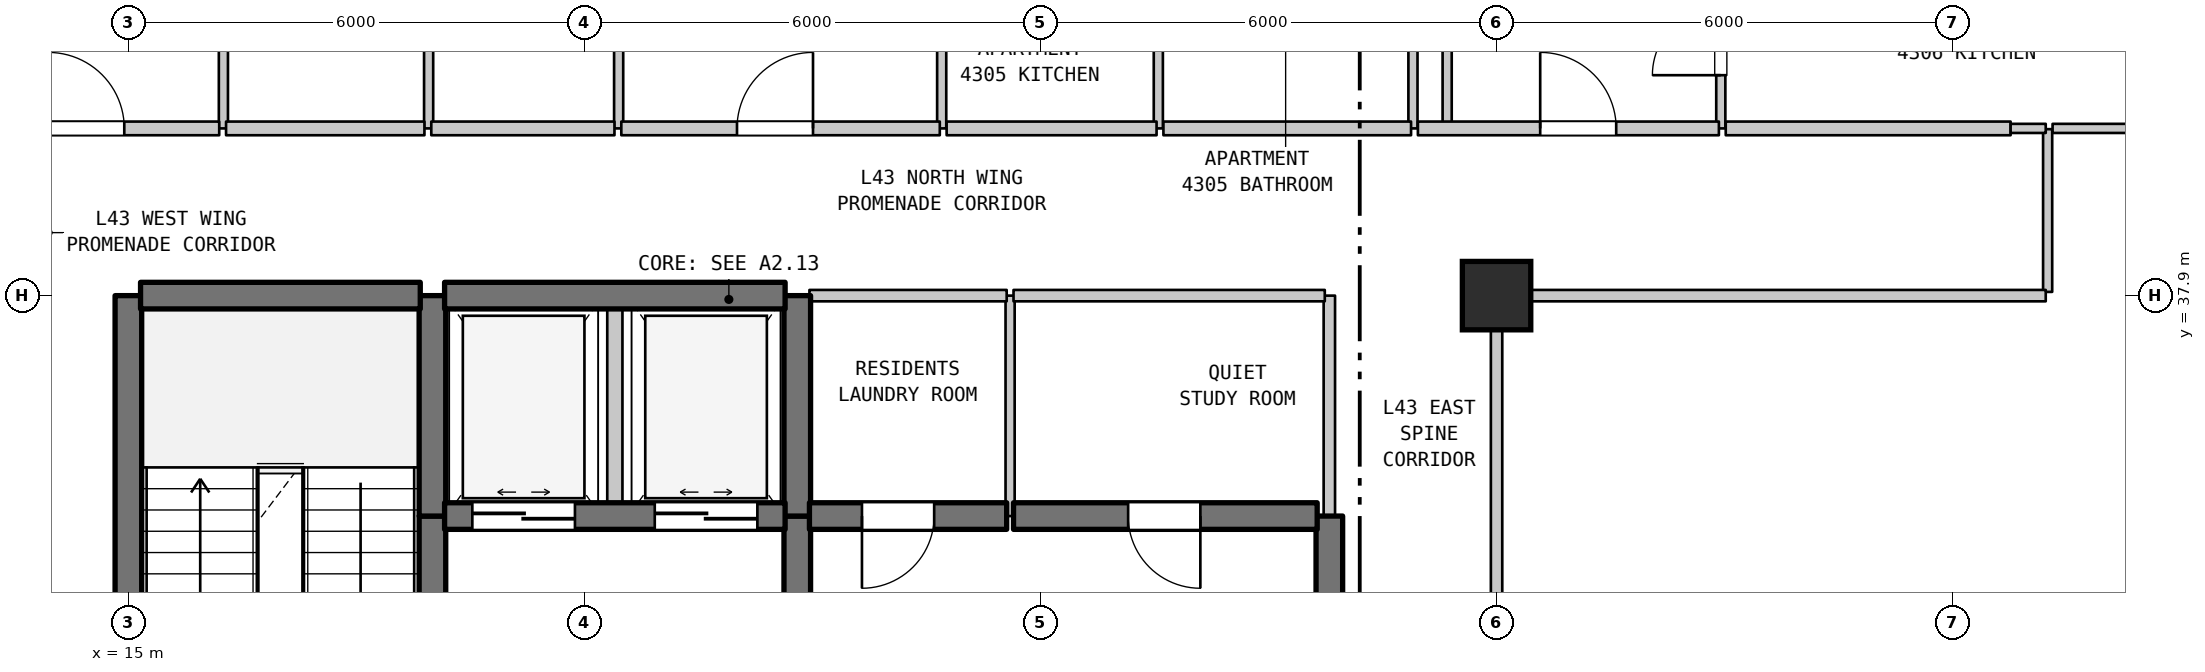
"""IFC4 building model, lengths in metres.
Left out: names, types, materials, properties, quantities, classifications, styles, units other than length and angle.
Written with IfcOpenShell. Run it as: python <this file> out.ifc"""

import sys

from ifc_helpers import new_model, si_unit, direction, frame, frame_2d, origin, origin_2d, place, context, subcontext, project, spatial, rectangle, extrude, element, fill, save


model = new_model("IFC4")
c1 = context("Model", 3, precision=1e-05, world=origin(), true_north=direction((0.0, 1.0)))
c2 = subcontext(c1, "Body", "Model", "MODEL_VIEW")
j1 = project(units=[si_unit("LENGTHUNIT", "METRE"), si_unit("PLANEANGLEUNIT", "RADIAN")], contexts=[c1])
p1 = place(None, origin())
s1 = spatial("IfcSite", under=j1, at=p1, CompositionType="ELEMENT")
p2 = place(p1, origin())
s2 = spatial("IfcBuilding", under=s1, at=p2, CompositionType="ELEMENT")
p3 = place(p2, frame((0.0, 0.0, 176.5)))
s3 = spatial("IfcBuildingStorey", under=s2, at=p3, CompositionType="ELEMENT", Elevation=176.5)
p4 = place(p3, frame((33.0, 37.9, 0.0), z_axis=(0.0, 0.0, 1.0), x_axis=(1.0, 0.0, 0.0)))
e1 = element("IfcColumn", 1, at=p4, inside=s3, PredefinedType="COLUMN", context=c2, shape_type="SweptSolid", body=[
    extrude(rectangle(XDim=0.9, YDim=0.9, at=origin_2d()), origin(), (0.0, 0.0, 1.0), 3.7),
])
p5 = place(p3, frame((15.0, 31.1, 0.0), z_axis=(0.0, 0.0, 1.0), x_axis=(0.0, 1.0, 0.0)))
e2 = element("IfcWall", 2, at=p5, inside=s3, PredefinedType="SHEAR", context=c2, shape_type="SweptSolid", body=[
    extrude(rectangle(XDim=6.8, YDim=0.35, at=frame_2d((3.4, 0.0))), origin(), (0.0, 0.0, 1.0), 3.39),
])
p6 = place(p3, frame((16.25, 40.1, 0.0), z_axis=(0.0, 0.0, 1.0), x_axis=(0.0, 1.0, 0.0)))
e3 = element("IfcWall", 3, at=p6, inside=s3, PredefinedType="PARTITIONING", context=c2, shape_type="SweptSolid", body=[
    extrude(rectangle(XDim=3.2, YDim=0.12, at=frame_2d((1.6, 0.0))), origin(), (0.0, 0.0, 1.0), 3.39),
])
p7 = place(p3, frame((18.95, 40.1, 0.0), z_axis=(0.0, 0.0, 1.0), x_axis=(0.0, 1.0, 0.0)))
e4 = element("IfcWall", 4, at=p7, inside=s3, PredefinedType="PARTITIONING", context=c2, shape_type="SweptSolid", body=[
    extrude(rectangle(XDim=3.2, YDim=0.12, at=frame_2d((1.6, 0.0))), origin(), (0.0, 0.0, 1.0), 3.39),
])
p8 = place(p7, frame((1.15, 0.0, 0.0)))
e5 = element("IfcOpeningElement", 5, at=p8, cuts=e4, PredefinedType="OPENING", context=c2, shape_type="SweptSolid", body=[
    extrude(rectangle(XDim=0.9, YDim=2.15, at=frame_2d((0.45, 1.075))), frame((0.0, 0.07, 0.0), z_axis=(0.0, -1.0, 0.0), x_axis=(1.0, 0.0, 0.0)), (0.0, 0.0, 1.0), 0.14),
])
p9 = place(p3, frame((19.0, 29.5, 0.0), z_axis=(0.0, 0.0, 1.0), x_axis=(0.0, 1.0, 0.0)))
e6 = element("IfcWall", 6, at=p9, inside=s3, PredefinedType="SHEAR", context=c2, shape_type="SweptSolid", body=[
    extrude(rectangle(XDim=5.5, YDim=0.35, at=frame_2d((2.75, 0.0))), origin(), (0.0, 0.0, 1.0), 3.39),
])
p10 = place(p9, frame((2.025, 0.0, 0.0)))
e7 = element("IfcOpeningElement", 7, at=p10, cuts=e6, PredefinedType="OPENING", context=c2, shape_type="SweptSolid", body=[
    extrude(rectangle(XDim=1.1, YDim=2.15, at=frame_2d((0.55, 1.075))), frame((0.0, 0.185, 0.0), z_axis=(0.0, -1.0, 0.0), x_axis=(1.0, 0.0, 0.0)), (0.0, 0.0, 1.0), 0.37),
])
p11 = place(p3, frame((19.0, 35.0, 0.0), z_axis=(0.0, 0.0, 1.0), x_axis=(0.0, 1.0, 0.0)))
e8 = element("IfcWall", 8, at=p11, inside=s3, PredefinedType="SHEAR", context=c2, shape_type="SweptSolid", body=[
    extrude(rectangle(XDim=2.9, YDim=0.35, at=frame_2d((1.45, 0.0))), origin(), (0.0, 0.0, 1.0), 3.39),
])
p12 = place(p3, frame((21.4, 35.0, 0.0), z_axis=(0.0, 0.0, 1.0), x_axis=(0.0, 1.0, 0.0)))
e9 = element("IfcWall", 9, at=p12, inside=s3, PredefinedType="STANDARD", context=c2, shape_type="SweptSolid", body=[
    extrude(rectangle(XDim=2.9, YDim=0.2, at=frame_2d((1.45, 0.0))), origin(), (0.0, 0.0, 1.0), 3.39),
])
p13 = place(p3, frame((21.45, 40.1, 0.0), z_axis=(0.0, 0.0, 1.0), x_axis=(0.0, 1.0, 0.0)))
e10 = element("IfcWall", 10, at=p13, inside=s3, PredefinedType="PARTITIONING", context=c2, shape_type="SweptSolid", body=[
    extrude(rectangle(XDim=13.79, YDim=0.12, at=frame_2d((6.895, 0.0))), origin(), (0.0, 0.0, 1.0), 3.39),
])
p14 = place(p3, frame((23.8, 31.5, 0.0), z_axis=(0.0, 0.0, 1.0), x_axis=(0.0, 1.0, 0.0)))
e11 = element("IfcWall", 11, at=p14, inside=s3, PredefinedType="SHEAR", context=c2, shape_type="SweptSolid", body=[
    extrude(rectangle(XDim=3.5, YDim=0.35, at=frame_2d((1.75, 0.0))), origin(), (0.0, 0.0, 1.0), 3.39),
])
p15 = place(p14, frame((1.127, 0.0, 0.0)))
e12 = element("IfcOpeningElement", 12, at=p15, cuts=e11, PredefinedType="OPENING", context=c2, shape_type="SweptSolid", body=[
    extrude(rectangle(XDim=1.1, YDim=2.15, at=frame_2d((0.55, 1.075))), frame((0.0, 0.185, 0.0), z_axis=(0.0, -1.0, 0.0), x_axis=(1.0, 0.0, 0.0)), (0.0, 0.0, 1.0), 0.37),
])
p16 = place(p3, frame((23.8, 35.0, 0.0), z_axis=(0.0, 0.0, 1.0), x_axis=(0.0, 1.0, 0.0)))
e13 = element("IfcWall", 13, at=p16, inside=s3, PredefinedType="SHEAR", context=c2, shape_type="SweptSolid", body=[
    extrude(rectangle(XDim=2.9, YDim=0.35, at=frame_2d((1.45, 0.0))), origin(), (0.0, 0.0, 1.0), 3.39),
])
p17 = place(p3, frame((25.7, 40.1, 0.0), z_axis=(0.0, 0.0, 1.0), x_axis=(0.0, 1.0, 0.0)))
e14 = element("IfcWall", 14, at=p17, inside=s3, PredefinedType="PARTITIONING", context=c2, shape_type="SweptSolid", body=[
    extrude(rectangle(XDim=2.3, YDim=0.12, at=frame_2d((1.15, 0.0))), origin(), (0.0, 0.0, 1.0), 3.39),
])
p18 = place(p3, frame((26.6, 35.0, 0.0), z_axis=(0.0, 0.0, 1.0), x_axis=(0.0, 1.0, 0.0)))
e15 = element("IfcWall", 15, at=p18, inside=s3, PredefinedType="PARTITIONING", context=c2, shape_type="SweptSolid", body=[
    extrude(rectangle(XDim=2.9, YDim=0.12, at=frame_2d((1.45, 0.0))), origin(), (0.0, 0.0, 1.0), 3.39),
])
p19 = place(p3, frame((28.55, 40.1, 0.0), z_axis=(0.0, 0.0, 1.0), x_axis=(0.0, 1.0, 0.0)))
e16 = element("IfcWall", 16, at=p19, inside=s3, PredefinedType="PARTITIONING", context=c2, shape_type="SweptSolid", body=[
    extrude(rectangle(XDim=2.3, YDim=0.12, at=frame_2d((1.15, 0.0))), origin(), (0.0, 0.0, 1.0), 3.39),
])
p20 = place(p3, frame((30.8, 31.5, 0.0), z_axis=(0.0, 0.0, 1.0), x_axis=(0.0, 1.0, 0.0)))
e17 = element("IfcWall", 17, at=p20, inside=s3, PredefinedType="SHEAR", context=c2, shape_type="SweptSolid", body=[
    extrude(rectangle(XDim=3.5, YDim=0.35, at=frame_2d((1.75, 0.0))), origin(), (0.0, 0.0, 1.0), 3.39),
])
p21 = place(p20, frame((1.15, 0.0, 0.0)))
e18 = element("IfcOpeningElement", 18, at=p21, cuts=e17, PredefinedType="OPENING", context=c2, shape_type="SweptSolid", body=[
    extrude(rectangle(XDim=1.2, YDim=2.2, at=frame_2d((0.6, 1.1))), frame((0.0, 0.185, 0.0), z_axis=(0.0, -1.0, 0.0), x_axis=(1.0, 0.0, 0.0)), (0.0, 0.0, 1.0), 0.37),
])
p22 = place(p3, frame((30.8, 35.0, 0.0), z_axis=(0.0, 0.0, 1.0), x_axis=(0.0, 1.0, 0.0)))
e19 = element("IfcWall", 19, at=p22, inside=s3, PredefinedType="STANDARD", context=c2, shape_type="SweptSolid", body=[
    extrude(rectangle(XDim=2.9, YDim=0.15, at=frame_2d((1.45, 0.0))), origin(), (0.0, 0.0, 1.0), 3.39),
])
p23 = place(p3, frame((31.9, 40.1, 0.0), z_axis=(0.0, 0.0, 1.0), x_axis=(0.0, 1.0, 0.0)))
e20 = element("IfcWall", 20, at=p23, inside=s3, PredefinedType="PARTITIONING", context=c2, shape_type="SweptSolid", body=[
    extrude(rectangle(XDim=2.3, YDim=0.12, at=frame_2d((1.15, 0.0))), origin(), (0.0, 0.0, 1.0), 3.39),
])
p24 = place(p3, frame((32.35, 40.1, 0.0), z_axis=(0.0, 0.0, 1.0), x_axis=(0.0, 1.0, 0.0)))
e21 = element("IfcWall", 21, at=p24, inside=s3, PredefinedType="PARTITIONING", context=c2, shape_type="SweptSolid", body=[
    extrude(rectangle(XDim=13.79, YDim=0.12, at=frame_2d((6.895, 0.0))), origin(), (0.0, 0.0, 1.0), 3.39),
])
p25 = place(p3, frame((35.95, 40.1, 0.0), z_axis=(0.0, 0.0, 1.0), x_axis=(0.0, 1.0, 0.0)))
e22 = element("IfcWall", 22, at=p25, inside=s3, PredefinedType="PARTITIONING", context=c2, shape_type="SweptSolid", body=[
    extrude(rectangle(XDim=2.3, YDim=0.12, at=frame_2d((1.15, 0.0))), origin(), (0.0, 0.0, 1.0), 3.39),
])
p26 = place(p25, frame((0.7, 0.0, 0.0)))
e23 = element("IfcOpeningElement", 23, at=p26, cuts=e22, PredefinedType="OPENING", context=c2, shape_type="SweptSolid", body=[
    extrude(rectangle(XDim=0.9, YDim=2.15, at=frame_2d((0.45, 1.075))), frame((0.0, 0.07, 0.0), z_axis=(0.0, -1.0, 0.0), x_axis=(1.0, 0.0, 0.0)), (0.0, 0.0, 1.0), 0.14),
])
p27 = place(p3, frame((40.25, 37.949, 0.0), z_axis=(0.0, 0.0, 1.0), x_axis=(0.0, 1.0, 0.0)))
e24 = element("IfcWall", 24, at=p27, inside=s3, PredefinedType="PARTITIONING", context=c2, shape_type="SweptSolid", body=[
    extrude(rectangle(XDim=2.141, YDim=0.12, at=frame_2d((1.071, 0.0))), origin(), (0.0, 0.0, 1.0), 3.39),
])
p28 = place(p3, frame((19.16, 35.0, 0.0), z_axis=(0.0, 0.0, 1.0), x_axis=(1.0, 0.0, 0.0)))
e25 = element("IfcWall", 25, at=p28, inside=s3, PredefinedType="SHEAR", context=c2, shape_type="SweptSolid", body=[
    extrude(rectangle(XDim=4.48, YDim=0.35, at=frame_2d((2.24, 0.0))), origin(), (0.0, 0.0, 1.0), 3.39),
])
p29 = place(p28, frame((0.365, 0.0, 0.0)))
e26 = element("IfcOpeningElement", 26, at=p29, cuts=e25, PredefinedType="OPENING", context=c2, shape_type="SweptSolid", body=[
    extrude(rectangle(XDim=1.35, YDim=2.2, at=frame_2d((0.675, 1.1))), frame((0.0, 0.185, 0.0), z_axis=(0.0, -1.0, 0.0), x_axis=(1.0, 0.0, 0.0)), (0.0, 0.0, 1.0), 0.37),
])
p30 = place(p28, frame((2.765, 0.0, 0.0)))
e27 = element("IfcOpeningElement", 27, at=p30, cuts=e25, PredefinedType="OPENING", context=c2, shape_type="SweptSolid", body=[
    extrude(rectangle(XDim=1.35, YDim=2.2, at=frame_2d((0.675, 1.1))), frame((0.0, 0.185, 0.0), z_axis=(0.0, -1.0, 0.0), x_axis=(1.0, 0.0, 0.0)), (0.0, 0.0, 1.0), 0.37),
])
p31 = place(p3, frame((23.96, 35.0, 0.0), z_axis=(0.0, 0.0, 1.0), x_axis=(1.0, 0.0, 0.0)))
e28 = element("IfcWall", 28, at=p31, inside=s3, PredefinedType="SHEAR", context=c2, shape_type="SweptSolid", body=[
    extrude(rectangle(XDim=2.595, YDim=0.35, at=frame_2d((1.297, 0.0))), origin(), (0.0, 0.0, 1.0), 3.39),
])
p32 = place(p31, frame((0.691, 0.0, 0.0)))
e29 = element("IfcOpeningElement", 29, at=p32, cuts=e28, PredefinedType="OPENING", context=c2, shape_type="SweptSolid", body=[
    extrude(rectangle(XDim=0.95, YDim=2.15, at=frame_2d((0.475, 1.075))), frame((0.0, 0.185, 0.0), z_axis=(0.0, -1.0, 0.0), x_axis=(1.0, 0.0, 0.0)), (0.0, 0.0, 1.0), 0.37),
])
p33 = place(p3, frame((26.645, 35.0, 0.0), z_axis=(0.0, 0.0, 1.0), x_axis=(1.0, 0.0, 0.0)))
e30 = element("IfcWall", 30, at=p33, inside=s3, PredefinedType="SHEAR", context=c2, shape_type="SweptSolid", body=[
    extrude(rectangle(XDim=3.995, YDim=0.35, at=frame_2d((1.998, 0.0))), origin(), (0.0, 0.0, 1.0), 3.39),
])
p34 = place(p33, frame((1.508, 0.0, 0.0)))
e31 = element("IfcOpeningElement", 31, at=p34, cuts=e30, PredefinedType="OPENING", context=c2, shape_type="SweptSolid", body=[
    extrude(rectangle(XDim=0.95, YDim=2.15, at=frame_2d((0.475, 1.075))), frame((0.0, 0.185, 0.0), z_axis=(0.0, -1.0, 0.0), x_axis=(1.0, 0.0, 0.0)), (0.0, 0.0, 1.0), 0.37),
])
p35 = place(p3, frame((15.16, 37.9, 0.0), z_axis=(0.0, 0.0, 1.0), x_axis=(1.0, 0.0, 0.0)))
e32 = element("IfcWall", 32, at=p35, inside=s3, PredefinedType="SHEAR", context=c2, shape_type="SweptSolid", body=[
    extrude(rectangle(XDim=3.68, YDim=0.35, at=frame_2d((1.84, 0.0))), origin(), (0.0, 0.0, 1.0), 3.39),
])
p36 = place(p3, frame((19.16, 37.9, 0.0), z_axis=(0.0, 0.0, 1.0), x_axis=(1.0, 0.0, 0.0)))
e33 = element("IfcWall", 33, at=p36, inside=s3, PredefinedType="SHEAR", context=c2, shape_type="SweptSolid", body=[
    extrude(rectangle(XDim=4.48, YDim=0.35, at=frame_2d((2.24, 0.0))), origin(), (0.0, 0.0, 1.0), 3.39),
])
p37 = place(p3, frame((23.96, 37.9, 0.0), z_axis=(0.0, 0.0, 1.0), x_axis=(1.0, 0.0, 0.0)))
e34 = element("IfcWall", 34, at=p37, inside=s3, PredefinedType="STANDARD", context=c2, shape_type="SweptSolid", body=[
    extrude(rectangle(XDim=2.595, YDim=0.15, at=frame_2d((1.297, 0.0))), origin(), (0.0, 0.0, 1.0), 2.89),
])
p38 = place(p3, frame((26.645, 37.9, 0.0), z_axis=(0.0, 0.0, 1.0), x_axis=(1.0, 0.0, 0.0)))
e35 = element("IfcWall", 35, at=p38, inside=s3, PredefinedType="STANDARD", context=c2, shape_type="SweptSolid", body=[
    extrude(rectangle(XDim=4.095, YDim=0.15, at=frame_2d((2.047, 0.0))), origin(), (0.0, 0.0, 1.0), 2.89),
])
p39 = place(p3, frame((33.07, 37.9, 0.0), z_axis=(0.0, 0.0, 1.0), x_axis=(1.0, 0.0, 0.0)))
e36 = element("IfcWall", 36, at=p39, inside=s3, PredefinedType="STANDARD", context=c2, shape_type="SweptSolid", body=[
    extrude(rectangle(XDim=7.155, YDim=0.15, at=frame_2d((3.578, 0.0))), origin(), (0.0, 0.0, 1.0), 3.39),
])
p40 = place(p3, frame((12.875, 40.1, 0.0), z_axis=(0.0, 0.0, 1.0), x_axis=(1.0, 0.0, 0.0)))
e37 = element("IfcWall", 37, at=p40, inside=s3, PredefinedType="STANDARD", context=c2, shape_type="SweptSolid", body=[
    extrude(rectangle(XDim=3.32, YDim=0.18, at=frame_2d((1.66, 0.0))), origin(), (0.0, 0.0, 1.0), 3.39),
])
p41 = place(p40, frame((1.071, 0.0, 0.0)))
e38 = element("IfcOpeningElement", 38, at=p41, cuts=e37, PredefinedType="OPENING", context=c2, shape_type="SweptSolid", body=[
    extrude(rectangle(XDim=1.0, YDim=2.15, at=frame_2d((0.5, 1.075))), frame((0.0, 0.1, 0.0), z_axis=(0.0, -1.0, 0.0), x_axis=(1.0, 0.0, 0.0)), (0.0, 0.0, 1.0), 0.2),
])
p42 = place(p3, frame((16.285, 40.1, 0.0), z_axis=(0.0, 0.0, 1.0), x_axis=(1.0, 0.0, 0.0)))
e39 = element("IfcWall", 39, at=p42, inside=s3, PredefinedType="STANDARD", context=c2, shape_type="SweptSolid", body=[
    extrude(rectangle(XDim=2.61, YDim=0.18, at=frame_2d((1.305, 0.0))), origin(), (0.0, 0.0, 1.0), 3.39),
])
p43 = place(p3, frame((18.985, 40.1, 0.0), z_axis=(0.0, 0.0, 1.0), x_axis=(1.0, 0.0, 0.0)))
e40 = element("IfcWall", 40, at=p43, inside=s3, PredefinedType="STANDARD", context=c2, shape_type="SweptSolid", body=[
    extrude(rectangle(XDim=2.41, YDim=0.18, at=frame_2d((1.205, 0.0))), origin(), (0.0, 0.0, 1.0), 3.39),
])
p44 = place(p3, frame((21.485, 40.1, 0.0), z_axis=(0.0, 0.0, 1.0), x_axis=(1.0, 0.0, 0.0)))
e41 = element("IfcWall", 41, at=p44, inside=s3, PredefinedType="STANDARD", context=c2, shape_type="SweptSolid", body=[
    extrude(rectangle(XDim=4.19, YDim=0.18, at=frame_2d((2.095, 0.0))), origin(), (0.0, 0.0, 1.0), 3.39),
])
p45 = place(p44, frame((1.522, 0.0, 0.0)))
e42 = element("IfcOpeningElement", 42, at=p45, cuts=e41, PredefinedType="OPENING", context=c2, shape_type="SweptSolid", body=[
    extrude(rectangle(XDim=1.0, YDim=2.15, at=frame_2d((0.5, 1.075))), frame((0.0, 0.1, 0.0), z_axis=(0.0, -1.0, 0.0), x_axis=(1.0, 0.0, 0.0)), (0.0, 0.0, 1.0), 0.2),
])
p46 = place(p3, frame((25.765, 40.1, 0.0), z_axis=(0.0, 0.0, 1.0), x_axis=(1.0, 0.0, 0.0)))
e43 = element("IfcWall", 43, at=p46, inside=s3, PredefinedType="STANDARD", context=c2, shape_type="SweptSolid", body=[
    extrude(rectangle(XDim=2.762, YDim=0.18, at=frame_2d((1.381, 0.0))), origin(), (0.0, 0.0, 1.0), 3.39),
])
p47 = place(p3, frame((28.617, 40.1, 0.0), z_axis=(0.0, 0.0, 1.0), x_axis=(1.0, 0.0, 0.0)))
e44 = element("IfcWall", 44, at=p47, inside=s3, PredefinedType="STANDARD", context=c2, shape_type="SweptSolid", body=[
    extrude(rectangle(XDim=3.258, YDim=0.18, at=frame_2d((1.629, 0.0))), origin(), (0.0, 0.0, 1.0), 3.39),
])
p48 = place(p3, frame((31.965, 40.1, 0.0), z_axis=(0.0, 0.0, 1.0), x_axis=(1.0, 0.0, 0.0)))
e45 = element("IfcWall", 45, at=p48, inside=s3, PredefinedType="STANDARD", context=c2, shape_type="SweptSolid", body=[
    extrude(rectangle(XDim=3.96, YDim=0.18, at=frame_2d((1.98, 0.0))), origin(), (0.0, 0.0, 1.0), 3.39),
])
p49 = place(p48, frame((1.609, 0.0, 0.0)))
e46 = element("IfcOpeningElement", 46, at=p49, cuts=e45, PredefinedType="OPENING", context=c2, shape_type="SweptSolid", body=[
    extrude(rectangle(XDim=1.0, YDim=2.15, at=frame_2d((0.5, 1.075))), frame((0.0, 0.1, 0.0), z_axis=(0.0, -1.0, 0.0), x_axis=(1.0, 0.0, 0.0)), (0.0, 0.0, 1.0), 0.2),
])
p50 = place(p3, frame((36.015, 40.1, 0.0), z_axis=(0.0, 0.0, 1.0), x_axis=(1.0, 0.0, 0.0)))
e47 = element("IfcWall", 47, at=p50, inside=s3, PredefinedType="STANDARD", context=c2, shape_type="SweptSolid", body=[
    extrude(rectangle(XDim=3.748, YDim=0.18, at=frame_2d((1.874, 0.0))), origin(), (0.0, 0.0, 1.0), 3.39),
])
p51 = place(p3, frame((39.763, 40.1, 0.0), z_axis=(0.0, 0.0, 1.0), x_axis=(1.0, 0.0, 0.0)))
e48 = element("IfcWall", 48, at=p51, inside=s3, PredefinedType="PARTITIONING", context=c2, shape_type="SweptSolid", body=[
    extrude(rectangle(XDim=0.462, YDim=0.12, at=frame_2d((0.231, 0.0))), origin(), (0.0, 0.0, 1.0), 3.39),
])
p52 = place(p3, frame((40.315, 40.1, 0.0), z_axis=(0.0, 0.0, 1.0), x_axis=(1.0, 0.0, 0.0)))
e49 = element("IfcWall", 49, at=p52, inside=s3, PredefinedType="PARTITIONING", context=c2, shape_type="SweptSolid", body=[
    extrude(rectangle(XDim=1.86, YDim=0.12, at=frame_2d((0.93, 0.0))), origin(), (0.0, 0.0, 1.0), 3.39),
])
p53 = place(p3, frame((33.0, 27.9, 0.0), z_axis=(0.0, 0.0, 1.0), x_axis=(0.0, 1.0, 0.0)))
e50 = element("IfcWall", 50, at=p53, inside=s3, PredefinedType="STANDARD", context=c2, shape_type="SweptSolid", body=[
    extrude(rectangle(XDim=9.99, YDim=0.15, at=frame_2d((4.995, 0.0))), origin(), (0.0, 0.0, 1.0), 2.89),
])
p54 = place(p53, frame((0.722, 0.0, 0.0)))
e51 = element("IfcOpeningElement", 51, at=p54, cuts=e50, PredefinedType="OPENING", context=c2, shape_type="SweptSolid", body=[
    extrude(rectangle(XDim=1.0, YDim=2.15, at=frame_2d((0.5, 1.075))), frame((0.0, 0.085, 0.0), z_axis=(0.0, -1.0, 0.0), x_axis=(1.0, 0.0, 0.0)), (0.0, 0.0, 1.0), 0.17),
])
p55 = place(p26, origin())
e52 = element("IfcDoor", 52, at=p55, inside=s3, OperationType="SINGLE_SWING_LEFT", PredefinedType="DOOR", context=c2, shape_type="SweptSolid", body=[
    extrude(rectangle(XDim=0.9, YDim=2.15, at=frame_2d((0.45, 1.075))), frame((0.0, 0.025, 0.0), z_axis=(0.0, -1.0, 0.0), x_axis=(1.0, 0.0, 0.0)), (0.0, 0.0, 1.0), 0.05),
])
fill(e23, e52)
p56 = place(p29, origin())
e53 = element("IfcDoor", 53, at=p56, inside=s3, OperationType="DOUBLE_DOOR_SLIDING", PredefinedType="DOOR", context=c2, shape_type="SweptSolid", body=[
    extrude(rectangle(XDim=1.35, YDim=2.2, at=frame_2d((0.675, 1.1))), frame((0.0, 0.025, 0.0), z_axis=(0.0, -1.0, 0.0), x_axis=(1.0, 0.0, 0.0)), (0.0, 0.0, 1.0), 0.05),
])
fill(e26, e53)
p57 = place(p30, origin())
e54 = element("IfcDoor", 54, at=p57, inside=s3, OperationType="DOUBLE_DOOR_SLIDING", PredefinedType="DOOR", context=c2, shape_type="SweptSolid", body=[
    extrude(rectangle(XDim=1.35, YDim=2.2, at=frame_2d((0.675, 1.1))), frame((0.0, 0.025, 0.0), z_axis=(0.0, -1.0, 0.0), x_axis=(1.0, 0.0, 0.0)), (0.0, 0.0, 1.0), 0.05),
])
fill(e27, e54)
p58 = place(p32, frame((0.95, 0.0, 0.0), z_axis=(0.0, 0.0, 1.0), x_axis=(-1.0, 0.0, 0.0)))
e55 = element("IfcDoor", 55, at=p58, inside=s3, OperationType="SINGLE_SWING_LEFT", PredefinedType="DOOR", context=c2, shape_type="SweptSolid", body=[
    extrude(rectangle(XDim=0.95, YDim=2.15, at=frame_2d((0.475, 1.075))), frame((0.0, 0.025, 0.0), z_axis=(0.0, -1.0, 0.0), x_axis=(1.0, 0.0, 0.0)), (0.0, 0.0, 1.0), 0.05),
])
fill(e29, e55)
p59 = place(p34, frame((0.95, 0.0, 0.0), z_axis=(0.0, 0.0, 1.0), x_axis=(-1.0, 0.0, 0.0)))
e56 = element("IfcDoor", 56, at=p59, inside=s3, OperationType="SINGLE_SWING_RIGHT", PredefinedType="DOOR", context=c2, shape_type="SweptSolid", body=[
    extrude(rectangle(XDim=0.95, YDim=2.15, at=frame_2d((0.475, 1.075))), frame((0.0, 0.025, 0.0), z_axis=(0.0, -1.0, 0.0), x_axis=(1.0, 0.0, 0.0)), (0.0, 0.0, 1.0), 0.05),
])
fill(e31, e56)
p60 = place(p41, origin())
e57 = element("IfcDoor", 57, at=p60, inside=s3, OperationType="SINGLE_SWING_LEFT", PredefinedType="DOOR", context=c2, shape_type="SweptSolid", body=[
    extrude(rectangle(XDim=1.0, YDim=2.15, at=frame_2d((0.5, 1.075))), frame((0.0, 0.025, 0.0), z_axis=(0.0, -1.0, 0.0), x_axis=(1.0, 0.0, 0.0)), (0.0, 0.0, 1.0), 0.05),
])
fill(e38, e57)
p61 = place(p45, origin())
e58 = element("IfcDoor", 58, at=p61, inside=s3, OperationType="SINGLE_SWING_RIGHT", PredefinedType="DOOR", context=c2, shape_type="SweptSolid", body=[
    extrude(rectangle(XDim=1.0, YDim=2.15, at=frame_2d((0.5, 1.075))), frame((0.0, 0.025, 0.0), z_axis=(0.0, -1.0, 0.0), x_axis=(1.0, 0.0, 0.0)), (0.0, 0.0, 1.0), 0.05),
])
fill(e42, e58)
p62 = place(p49, origin())
e59 = element("IfcDoor", 59, at=p62, inside=s3, OperationType="SINGLE_SWING_LEFT", PredefinedType="DOOR", context=c2, shape_type="SweptSolid", body=[
    extrude(rectangle(XDim=1.0, YDim=2.15, at=frame_2d((0.5, 1.075))), frame((0.0, 0.025, 0.0), z_axis=(0.0, -1.0, 0.0), x_axis=(1.0, 0.0, 0.0)), (0.0, 0.0, 1.0), 0.05),
])
fill(e46, e59)
save(model, sys.argv[1])
